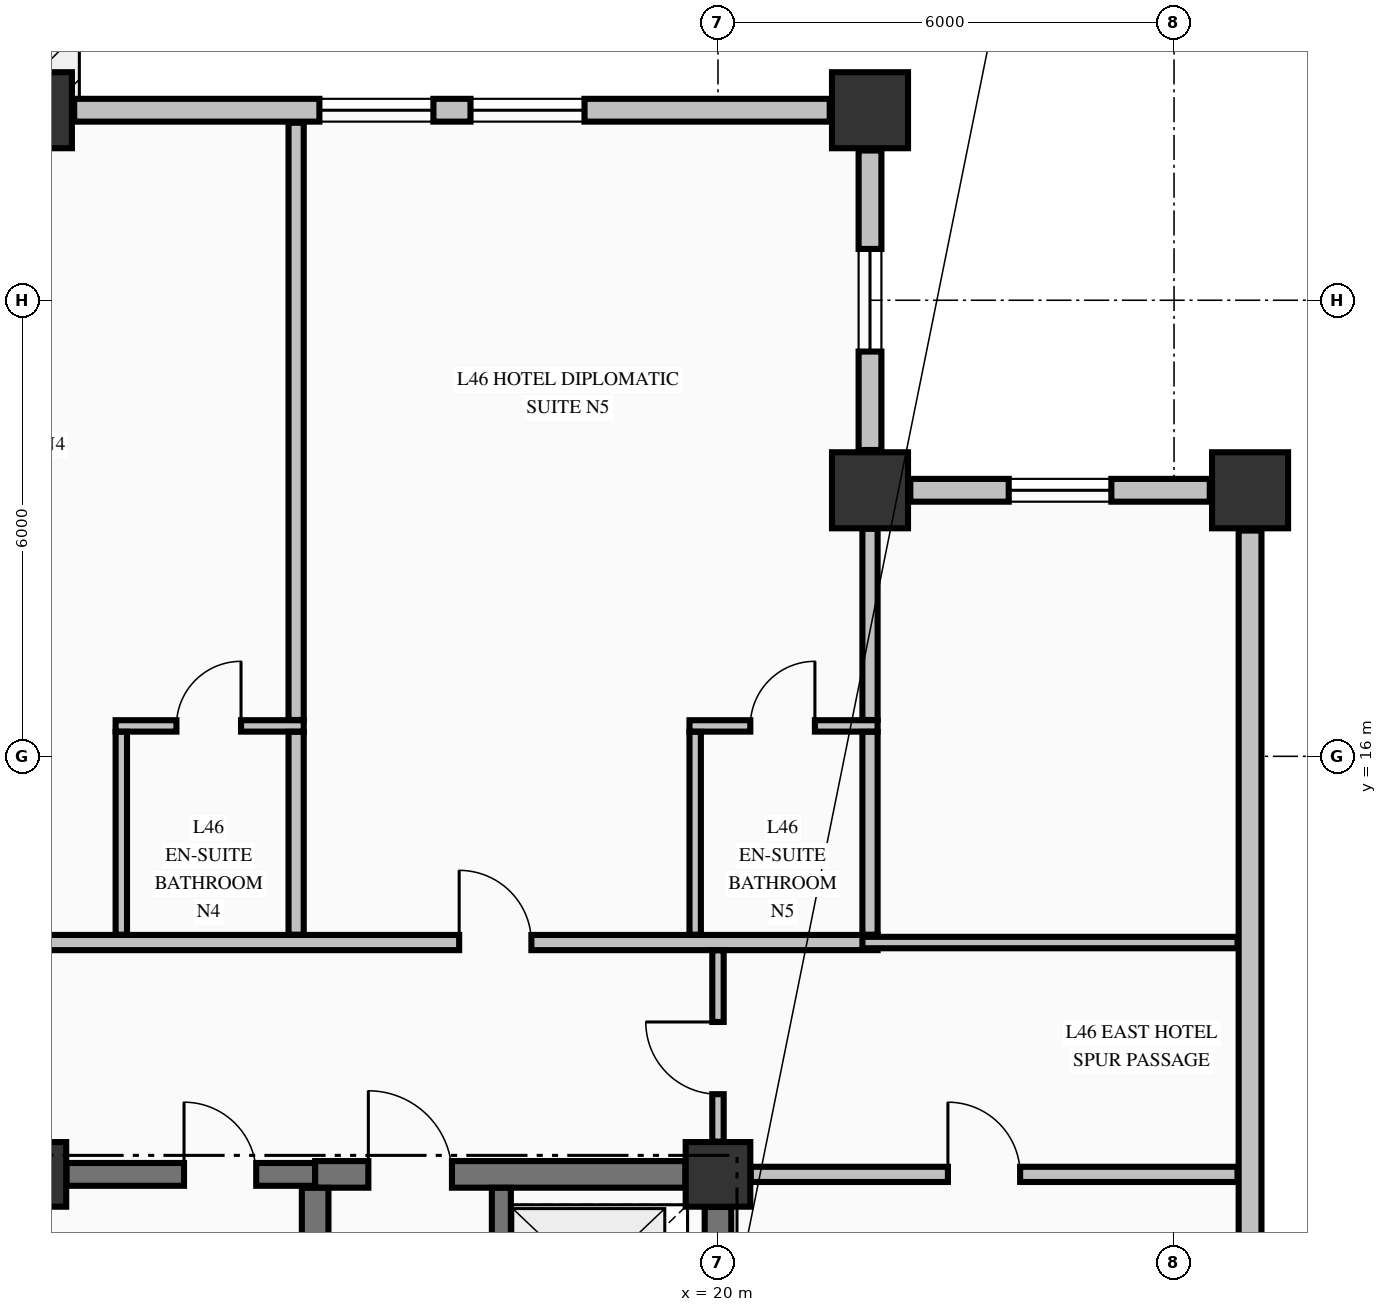
"""IFC4 building model, lengths in metres.
Left out: names, types, materials, properties, quantities, classifications, styles, units other than length and angle.
Written with IfcOpenShell. Run it as: python <this file> out.ifc"""

import sys

from ifc_helpers import new_model, si_unit, direction, frame, frame_2d, origin, origin_2d, place, context, subcontext, project, spatial, rectangle, extrude, element, fill, save


model = new_model("IFC4")
c1 = context("Model", 3, precision=1e-05, world=origin(), true_north=direction((0.0, 1.0)))
c2 = subcontext(c1, "Body", "Model", "MODEL_VIEW")
j1 = project(units=[si_unit("LENGTHUNIT", "METRE"), si_unit("PLANEANGLEUNIT", "RADIAN")], contexts=[c1])
p1 = place(None, origin())
s1 = spatial("IfcSite", under=j1, at=p1, CompositionType="ELEMENT")
p2 = place(p1, origin())
s2 = spatial("IfcBuilding", under=s1, at=p2, CompositionType="ELEMENT")
p3 = place(p2, frame((0.0, 0.0, 179.66)))
s3 = spatial("IfcBuildingStorey", under=s2, at=p3, CompositionType="ELEMENT", Elevation=179.66)
for number, where, z_axis, x_axis in (
    (1, (11.0, 24.5, -0.25), (0.0, 0.0, 1.0), (1.0, 0.0, 0.0)),
    (2, (22.0, 24.5, -0.25), (0.0, 0.0, 1.0), (1.0, 0.0, 0.0)),
    (3, (27.0, 19.5, -0.25), (0.0, 0.0, 1.0), (1.0, 0.0, 0.0)),
    (4, (22.0, 19.5, -0.25), (0.0, 0.0, 1.0), (1.0, 0.0, 0.0)),
):
    element("IfcColumn", number, at=place(p3, frame(where, z_axis=z_axis, x_axis=x_axis)), inside=s3, PredefinedType="COLUMN", context=c2, shape_type="SweptSolid", body=[
        extrude(rectangle(XDim=1.0, YDim=1.0, at=origin_2d()), origin(), (0.0, 0.0, 1.0), 3.4),
    ])
for number, where, z_axis, x_axis in (
    (5, (11.0, 10.5, -0.25), (0.0, 0.0, 1.0), (1.0, 0.0, 0.0)),
    (6, (20.0, 10.5, -0.25), (0.0, 0.0, 1.0), (1.0, 0.0, 0.0)),
):
    element("IfcColumn", number, at=place(p3, frame(where, z_axis=z_axis, x_axis=x_axis)), inside=s3, PredefinedType="COLUMN", context=c2, shape_type="SweptSolid", body=[
        extrude(rectangle(XDim=0.85, YDim=0.85, at=origin_2d()), origin(), (0.0, 0.0, 1.0), 3.4),
    ])
p4 = place(p3, frame((26.47, 19.5, 0.0), z_axis=(0.0, 0.0, 1.0), x_axis=(-1.0, 0.0, 0.0)))
e7 = element("IfcWall", 7, at=p4, inside=s3, PredefinedType="STANDARD", context=c2, shape_type="SweptSolid", body=[
    extrude(rectangle(XDim=3.94, YDim=0.3, at=frame_2d((1.97, 0.0))), origin(), (0.0, 0.0, 1.0), 2.542),
])
p5 = place(p4, frame((1.295, 0.0, 0.68)))
e8 = element("IfcOpeningElement", 8, at=p5, cuts=e7, PredefinedType="OPENING", context=c2, shape_type="SweptSolid", body=[
    extrude(rectangle(XDim=1.35, YDim=1.42, at=frame_2d((0.675, 0.71))), frame((0.0, 0.16, 0.0), z_axis=(0.0, -1.0, 0.0), x_axis=(1.0, 0.0, 0.0)), (0.0, 0.0, 1.0), 0.32),
])
p6 = place(p3, frame((22.0, 20.03, 0.0), z_axis=(0.0, 0.0, 1.0), x_axis=(0.0, 1.0, 0.0)))
e9 = element("IfcWall", 9, at=p6, inside=s3, PredefinedType="STANDARD", context=c2, shape_type="SweptSolid", body=[
    extrude(rectangle(XDim=3.94, YDim=0.3, at=frame_2d((1.97, 0.0))), origin(), (0.0, 0.0, 1.0), 2.542),
])
p7 = place(p6, frame((1.295, 0.0, 0.68)))
e10 = element("IfcOpeningElement", 10, at=p7, cuts=e9, PredefinedType="OPENING", context=c2, shape_type="SweptSolid", body=[
    extrude(rectangle(XDim=1.35, YDim=1.42, at=frame_2d((0.675, 0.71))), frame((0.0, 0.16, 0.0), z_axis=(0.0, -1.0, 0.0), x_axis=(1.0, 0.0, 0.0)), (0.0, 0.0, 1.0), 0.32),
])
p8 = place(p3, frame((21.47, 24.5, 0.0), z_axis=(0.0, 0.0, 1.0), x_axis=(-1.0, 0.0, 0.0)))
e11 = element("IfcWall", 11, at=p8, inside=s3, PredefinedType="STANDARD", context=c2, shape_type="SweptSolid", body=[
    extrude(rectangle(XDim=9.94, YDim=0.3, at=frame_2d((4.97, 0.0))), origin(), (0.0, 0.0, 1.0), 2.542),
])
p9 = place(p8, frame((3.226, 0.0, 0.72)))
e12 = element("IfcOpeningElement", 12, at=p9, cuts=e11, PredefinedType="OPENING", context=c2, shape_type="SweptSolid", body=[
    extrude(rectangle(XDim=1.5, YDim=1.6, at=frame_2d((0.75, 0.8))), frame((0.0, 0.16, 0.0), z_axis=(0.0, -1.0, 0.0), x_axis=(1.0, 0.0, 0.0)), (0.0, 0.0, 1.0), 0.32),
])
p10 = place(p8, frame((5.214, 0.0, 0.72)))
e13 = element("IfcOpeningElement", 13, at=p10, cuts=e11, PredefinedType="OPENING", context=c2, shape_type="SweptSolid", body=[
    extrude(rectangle(XDim=1.5, YDim=1.6, at=frame_2d((0.75, 0.8))), frame((0.0, 0.16, 0.0), z_axis=(0.0, -1.0, 0.0), x_axis=(1.0, 0.0, 0.0)), (0.0, 0.0, 1.0), 0.32),
])
p11 = place(p3, frame((27.0, 9.53, 0.0), z_axis=(0.0, 0.0, 1.0), x_axis=(0.0, 1.0, 0.0)))
e14 = element("IfcWall", 14, at=p11, inside=s3, PredefinedType="STANDARD", context=c2, shape_type="SweptSolid", body=[
    extrude(rectangle(XDim=9.44, YDim=0.3, at=frame_2d((4.72, 0.0))), origin(), (0.0, 0.0, 1.0), 2.542),
])
p12 = place(p3, frame((11.429, 10.5, 0.0), z_axis=(0.0, 0.0, 1.0), x_axis=(1.0, 0.0, 0.0)))
e15 = element("IfcWall", 15, at=p12, inside=s3, PredefinedType="SHEAR", context=c2, shape_type="SweptSolid", body=[
    extrude(rectangle(XDim=3.271, YDim=0.3, at=frame_2d((1.635, 0.0))), origin(), (0.0, 0.0, 1.0), 3.15),
])
p13 = place(p12, frame((1.546, 0.0, 0.0)))
e16 = element("IfcOpeningElement", 16, at=p13, cuts=e15, PredefinedType="OPENING", context=c2, shape_type="SweptSolid", body=[
    extrude(rectangle(XDim=0.95, YDim=2.15, at=frame_2d((0.475, 1.075))), frame((0.0, 0.16, 0.0), z_axis=(0.0, -1.0, 0.0), x_axis=(1.0, 0.0, 0.0)), (0.0, 0.0, 1.0), 0.32),
])
p14 = place(p3, frame((14.7, 10.5, 0.0), z_axis=(0.0, 0.0, 1.0), x_axis=(1.0, 0.0, 0.0)))
e17 = element("IfcWall", 17, at=p14, inside=s3, PredefinedType="SHEAR", context=c2, shape_type="SweptSolid", body=[
    extrude(rectangle(XDim=4.871, YDim=0.35, at=frame_2d((2.436, 0.0))), origin(), (0.0, 0.0, 1.0), 3.15),
])
p15 = place(p14, frame((0.7, 0.0, 0.0)))
e18 = element("IfcOpeningElement", 18, at=p15, cuts=e17, PredefinedType="OPENING", context=c2, shape_type="SweptSolid", body=[
    extrude(rectangle(XDim=1.1, YDim=2.15, at=frame_2d((0.55, 1.075))), frame((0.0, 0.185, 0.0), z_axis=(0.0, -1.0, 0.0), x_axis=(1.0, 0.0, 0.0)), (0.0, 0.0, 1.0), 0.37),
])
p16 = place(p3, frame((20.431, 10.5, 0.0), z_axis=(0.0, 0.0, 1.0), x_axis=(1.0, 0.0, 0.0)))
e19 = element("IfcWall", 19, at=p16, inside=s3, PredefinedType="PARTITIONING", context=c2, shape_type="SweptSolid", body=[
    extrude(rectangle(XDim=6.404, YDim=0.2, at=frame_2d((3.202, 0.0))), origin(), (0.0, 0.0, 1.0), 3.15),
])
p17 = place(p16, frame((2.594, 0.0, 0.0)))
e20 = element("IfcOpeningElement", 20, at=p17, cuts=e19, PredefinedType="OPENING", context=c2, shape_type="SweptSolid", body=[
    extrude(rectangle(XDim=0.95, YDim=2.15, at=frame_2d((0.475, 1.075))), frame((0.0, 0.11, 0.0), z_axis=(0.0, -1.0, 0.0), x_axis=(1.0, 0.0, 0.0)), (0.0, 0.0, 1.0), 0.22),
])
p18 = place(p3, frame((-17.1, 13.55, 0.0), z_axis=(0.0, 0.0, 1.0), x_axis=(1.0, 0.0, 0.0)))
e21 = element("IfcWall", 21, at=p18, inside=s3, PredefinedType="PARTITIONING", context=c2, shape_type="SweptSolid", body=[
    extrude(rectangle(XDim=39.2, YDim=0.2, at=frame_2d((19.6, 0.0))), origin(), (0.0, 0.0, 1.0), 3.15),
])
p19 = place(p18, frame((3.695, 0.0, 0.0)))
e22 = element("IfcOpeningElement", 22, at=p19, cuts=e21, PredefinedType="OPENING", context=c2, shape_type="SweptSolid", body=[
    extrude(rectangle(XDim=0.95, YDim=2.15, at=frame_2d((0.475, 1.075))), frame((0.0, 0.11, 0.0), z_axis=(0.0, -1.0, 0.0), x_axis=(1.0, 0.0, 0.0)), (0.0, 0.0, 1.0), 0.22),
])
p20 = place(p18, frame((11.695, 0.0, 0.0)))
e23 = element("IfcOpeningElement", 23, at=p20, cuts=e21, PredefinedType="OPENING", context=c2, shape_type="SweptSolid", body=[
    extrude(rectangle(XDim=0.95, YDim=2.15, at=frame_2d((0.475, 1.075))), frame((0.0, 0.11, 0.0), z_axis=(0.0, -1.0, 0.0), x_axis=(1.0, 0.0, 0.0)), (0.0, 0.0, 1.0), 0.22),
])
p21 = place(p18, frame((17.125, 0.0, 0.0)))
e24 = element("IfcOpeningElement", 24, at=p21, cuts=e21, PredefinedType="OPENING", context=c2, shape_type="SweptSolid", body=[
    extrude(rectangle(XDim=0.95, YDim=2.15, at=frame_2d((0.475, 1.075))), frame((0.0, 0.11, 0.0), z_axis=(0.0, -1.0, 0.0), x_axis=(1.0, 0.0, 0.0)), (0.0, 0.0, 1.0), 0.22),
])
p22 = place(p18, frame((25.325, 0.0, 0.0)))
e25 = element("IfcOpeningElement", 25, at=p22, cuts=e21, PredefinedType="OPENING", context=c2, shape_type="SweptSolid", body=[
    extrude(rectangle(XDim=0.95, YDim=2.15, at=frame_2d((0.475, 1.075))), frame((0.0, 0.11, 0.0), z_axis=(0.0, -1.0, 0.0), x_axis=(1.0, 0.0, 0.0)), (0.0, 0.0, 1.0), 0.22),
])
p23 = place(p18, frame((33.695, 0.0, 0.0)))
e26 = element("IfcOpeningElement", 26, at=p23, cuts=e21, PredefinedType="OPENING", context=c2, shape_type="SweptSolid", body=[
    extrude(rectangle(XDim=0.95, YDim=2.15, at=frame_2d((0.475, 1.075))), frame((0.0, 0.11, 0.0), z_axis=(0.0, -1.0, 0.0), x_axis=(1.0, 0.0, 0.0)), (0.0, 0.0, 1.0), 0.22),
])
p24 = place(p3, frame((21.9, 13.55, 0.0), z_axis=(0.0, 0.0, 1.0), x_axis=(1.0, 0.0, 0.0)))
e27 = element("IfcWall", 27, at=p24, inside=s3, PredefinedType="PARTITIONING", context=c2, shape_type="SweptSolid", body=[
    extrude(rectangle(XDim=4.935, YDim=0.15, at=frame_2d((2.468, 0.0))), origin(), (0.0, 0.0, 1.0), 3.15),
])
p25 = place(p3, frame((12.075, 16.4, 0.0), z_axis=(0.0, 0.0, 1.0), x_axis=(1.0, 0.0, 0.0)))
e28 = element("IfcWall", 28, at=p25, inside=s3, PredefinedType="PARTITIONING", context=c2, shape_type="SweptSolid", body=[
    extrude(rectangle(XDim=2.475, YDim=0.15, at=frame_2d((1.238, 0.0))), origin(), (0.0, 0.0, 1.0), 3.15),
])
p26 = place(p25, frame((0.8, 0.0, 0.0)))
e29 = element("IfcOpeningElement", 29, at=p26, cuts=e28, PredefinedType="OPENING", context=c2, shape_type="SweptSolid", body=[
    extrude(rectangle(XDim=0.85, YDim=2.1, at=frame_2d((0.425, 1.05))), frame((0.0, 0.085, 0.0), z_axis=(0.0, -1.0, 0.0), x_axis=(1.0, 0.0, 0.0)), (0.0, 0.0, 1.0), 0.17),
])
p27 = place(p3, frame((19.625, 16.4, 0.0), z_axis=(0.0, 0.0, 1.0), x_axis=(1.0, 0.0, 0.0)))
e30 = element("IfcWall", 30, at=p27, inside=s3, PredefinedType="PARTITIONING", context=c2, shape_type="SweptSolid", body=[
    extrude(rectangle(XDim=2.475, YDim=0.15, at=frame_2d((1.238, 0.0))), origin(), (0.0, 0.0, 1.0), 3.15),
])
p28 = place(p27, frame((0.8, 0.0, 0.0)))
e31 = element("IfcOpeningElement", 31, at=p28, cuts=e30, PredefinedType="OPENING", context=c2, shape_type="SweptSolid", body=[
    extrude(rectangle(XDim=0.85, YDim=2.1, at=frame_2d((0.425, 1.05))), frame((0.0, 0.085, 0.0), z_axis=(0.0, -1.0, 0.0), x_axis=(1.0, 0.0, 0.0)), (0.0, 0.0, 1.0), 0.17),
])
p29 = place(p3, frame((14.7, 5.852, 0.0), z_axis=(0.0, 0.0, 1.0), x_axis=(0.0, 1.0, 0.0)))
e32 = element("IfcWall", 32, at=p29, inside=s3, PredefinedType="SHEAR", context=c2, shape_type="SweptSolid", body=[
    extrude(rectangle(XDim=4.471, YDim=0.35, at=frame_2d((2.235, 0.0))), origin(), (0.0, 0.0, 1.0), 3.15),
])
p30 = place(p3, frame((17.15, 7.877, 0.0), z_axis=(0.0, 0.0, 1.0), x_axis=(0.0, 1.0, 0.0)))
e33 = element("IfcWall", 33, at=p30, inside=s3, PredefinedType="SOLIDWALL", context=c2, shape_type="SweptSolid", body=[
    extrude(rectangle(XDim=2.446, YDim=0.25, at=frame_2d((1.223, 0.0))), origin(), (0.0, 0.0, 1.0), 3.15),
])
p31 = place(p30, frame((0.698, 0.0, 0.0)))
e34 = element("IfcOpeningElement", 34, at=p31, cuts=e33, PredefinedType="OPENING", context=c2, shape_type="SweptSolid", body=[
    extrude(rectangle(XDim=1.1, YDim=2.2, at=frame_2d((0.55, 1.1))), frame((0.0, 0.135, 0.0), z_axis=(0.0, -1.0, 0.0), x_axis=(1.0, 0.0, 0.0)), (0.0, 0.0, 1.0), 0.27),
])
p32 = place(p3, frame((20.0, 7.877, 0.0), z_axis=(0.0, 0.0, 1.0), x_axis=(0.0, 1.0, 0.0)))
e35 = element("IfcWall", 35, at=p32, inside=s3, PredefinedType="SHEAR", context=c2, shape_type="SweptSolid", body=[
    extrude(rectangle(XDim=2.194, YDim=0.35, at=frame_2d((1.097, 0.0))), origin(), (0.0, 0.0, 1.0), 3.15),
])
p33 = place(p3, frame((12.15, 13.653, 0.0), z_axis=(0.0, 0.0, 1.0), x_axis=(0.0, 1.0, 0.0)))
e36 = element("IfcWall", 36, at=p33, inside=s3, PredefinedType="PARTITIONING", context=c2, shape_type="SweptSolid", body=[
    extrude(rectangle(XDim=2.669, YDim=0.15, at=frame_2d((1.334, 0.0))), origin(), (0.0, 0.0, 1.0), 3.15),
])
p34 = place(p3, frame((14.45, 13.653, 0.0), z_axis=(0.0, 0.0, 1.0), x_axis=(0.0, 1.0, 0.0)))
e37 = element("IfcWall", 37, at=p34, inside=s3, PredefinedType="PARTITIONING", context=c2, shape_type="SweptSolid", body=[
    extrude(rectangle(XDim=2.669, YDim=0.2, at=frame_2d((1.334, 0.0))), origin(), (0.0, 0.0, 1.0), 3.15),
])
p35 = place(p3, frame((14.45, 16.478, 0.0), z_axis=(0.0, 0.0, 1.0), x_axis=(0.0, 1.0, 0.0)))
e38 = element("IfcWall", 38, at=p35, inside=s3, PredefinedType="PARTITIONING", context=c2, shape_type="SweptSolid", body=[
    extrude(rectangle(XDim=7.857, YDim=0.2, at=frame_2d((3.928, 0.0))), origin(), (0.0, 0.0, 1.0), 3.15),
])
p36 = place(p3, frame((19.7, 13.653, 0.0), z_axis=(0.0, 0.0, 1.0), x_axis=(0.0, 1.0, 0.0)))
e39 = element("IfcWall", 39, at=p36, inside=s3, PredefinedType="PARTITIONING", context=c2, shape_type="SweptSolid", body=[
    extrude(rectangle(XDim=2.669, YDim=0.15, at=frame_2d((1.334, 0.0))), origin(), (0.0, 0.0, 1.0), 2.342),
])
p37 = place(p3, frame((20.0, 10.931, 0.0), z_axis=(0.0, 0.0, 1.0), x_axis=(0.0, 1.0, 0.0)))
e40 = element("IfcWall", 40, at=p37, inside=s3, PredefinedType="PARTITIONING", context=c2, shape_type="SweptSolid", body=[
    extrude(rectangle(XDim=2.516, YDim=0.15, at=frame_2d((1.258, 0.0))), origin(), (0.0, 0.0, 1.0), 2.342),
])
p38 = place(p37, frame((0.624, 0.0, 0.0)))
e41 = element("IfcOpeningElement", 41, at=p38, cuts=e40, PredefinedType="OPENING", context=c2, shape_type="SweptSolid", body=[
    extrude(rectangle(XDim=0.95, YDim=2.15, at=frame_2d((0.475, 1.075))), frame((0.0, 0.085, 0.0), z_axis=(0.0, -1.0, 0.0), x_axis=(1.0, 0.0, 0.0)), (0.0, 0.0, 1.0), 0.17),
])
p39 = place(p3, frame((22.0, 13.653, 0.0), z_axis=(0.0, 0.0, 1.0), x_axis=(0.0, 1.0, 0.0)))
e42 = element("IfcWall", 42, at=p39, inside=s3, PredefinedType="PARTITIONING", context=c2, shape_type="SweptSolid", body=[
    extrude(rectangle(XDim=2.669, YDim=0.2, at=frame_2d((1.334, 0.0))), origin(), (0.0, 0.0, 1.0), 3.15),
])
p40 = place(p3, frame((22.0, 16.478, 0.0), z_axis=(0.0, 0.0, 1.0), x_axis=(0.0, 1.0, 0.0)))
e43 = element("IfcWall", 43, at=p40, inside=s3, PredefinedType="PARTITIONING", context=c2, shape_type="SweptSolid", body=[
    extrude(rectangle(XDim=2.516, YDim=0.2, at=frame_2d((1.258, 0.0))), origin(), (0.0, 0.0, 1.0), 3.15),
])
p41 = place(p5, origin())
e44 = element("IfcWindow", 44, at=p41, inside=s3, PartitioningType="SINGLE_PANEL", PredefinedType="WINDOW", context=c2, shape_type="SweptSolid", body=[
    extrude(rectangle(XDim=1.35, YDim=1.42, at=frame_2d((0.675, 0.71))), frame((0.0, 0.03, 0.0), z_axis=(0.0, -1.0, 0.0), x_axis=(1.0, 0.0, 0.0)), (0.0, 0.0, 1.0), 0.06),
])
fill(e8, e44)
p42 = place(p7, origin())
e45 = element("IfcWindow", 45, at=p42, inside=s3, PartitioningType="SINGLE_PANEL", PredefinedType="WINDOW", context=c2, shape_type="SweptSolid", body=[
    extrude(rectangle(XDim=1.35, YDim=1.42, at=frame_2d((0.675, 0.71))), frame((0.0, 0.03, 0.0), z_axis=(0.0, -1.0, 0.0), x_axis=(1.0, 0.0, 0.0)), (0.0, 0.0, 1.0), 0.06),
])
fill(e10, e45)
p43 = place(p9, origin())
e46 = element("IfcWindow", 46, at=p43, inside=s3, PartitioningType="SINGLE_PANEL", PredefinedType="WINDOW", context=c2, shape_type="SweptSolid", body=[
    extrude(rectangle(XDim=1.5, YDim=1.6, at=frame_2d((0.75, 0.8))), frame((0.0, 0.03, 0.0), z_axis=(0.0, -1.0, 0.0), x_axis=(1.0, 0.0, 0.0)), (0.0, 0.0, 1.0), 0.06),
])
fill(e12, e46)
p44 = place(p10, origin())
e47 = element("IfcWindow", 47, at=p44, inside=s3, PartitioningType="SINGLE_PANEL", PredefinedType="WINDOW", context=c2, shape_type="SweptSolid", body=[
    extrude(rectangle(XDim=1.5, YDim=1.6, at=frame_2d((0.75, 0.8))), frame((0.0, 0.03, 0.0), z_axis=(0.0, -1.0, 0.0), x_axis=(1.0, 0.0, 0.0)), (0.0, 0.0, 1.0), 0.06),
])
fill(e13, e47)
p45 = place(p13, origin())
e48 = element("IfcDoor", 48, at=p45, inside=s3, OperationType="SINGLE_SWING_LEFT", PredefinedType="DOOR", context=c2, shape_type="SweptSolid", body=[
    extrude(rectangle(XDim=0.95, YDim=2.15, at=frame_2d((0.475, 1.075))), frame((0.0, 0.025, 0.0), z_axis=(0.0, -1.0, 0.0), x_axis=(1.0, 0.0, 0.0)), (0.0, 0.0, 1.0), 0.05),
])
fill(e16, e48)
p46 = place(p15, origin())
e49 = element("IfcDoor", 49, at=p46, inside=s3, OperationType="SINGLE_SWING_LEFT", PredefinedType="DOOR", context=c2, shape_type="SweptSolid", body=[
    extrude(rectangle(XDim=1.1, YDim=2.15, at=frame_2d((0.55, 1.075))), frame((0.0, 0.025, 0.0), z_axis=(0.0, -1.0, 0.0), x_axis=(1.0, 0.0, 0.0)), (0.0, 0.0, 1.0), 0.05),
])
fill(e18, e49)
p47 = place(p26, origin())
e50 = element("IfcDoor", 50, at=p47, inside=s3, OperationType="SINGLE_SWING_RIGHT", PredefinedType="DOOR", context=c2, shape_type="SweptSolid", body=[
    extrude(rectangle(XDim=0.85, YDim=2.1, at=frame_2d((0.425, 1.05))), frame((0.0, 0.025, 0.0), z_axis=(0.0, -1.0, 0.0), x_axis=(1.0, 0.0, 0.0)), (0.0, 0.0, 1.0), 0.05),
])
fill(e29, e50)
p48 = place(p23, origin())
e51 = element("IfcDoor", 51, at=p48, inside=s3, OperationType="SINGLE_SWING_LEFT", PredefinedType="DOOR", context=c2, shape_type="SweptSolid", body=[
    extrude(rectangle(XDim=0.95, YDim=2.15, at=frame_2d((0.475, 1.075))), frame((0.0, 0.025, 0.0), z_axis=(0.0, -1.0, 0.0), x_axis=(1.0, 0.0, 0.0)), (0.0, 0.0, 1.0), 0.05),
])
fill(e26, e51)
p49 = place(p28, origin())
e52 = element("IfcDoor", 52, at=p49, inside=s3, OperationType="SINGLE_SWING_RIGHT", PredefinedType="DOOR", context=c2, shape_type="SweptSolid", body=[
    extrude(rectangle(XDim=0.85, YDim=2.1, at=frame_2d((0.425, 1.05))), frame((0.0, 0.025, 0.0), z_axis=(0.0, -1.0, 0.0), x_axis=(1.0, 0.0, 0.0)), (0.0, 0.0, 1.0), 0.05),
])
fill(e31, e52)
p50 = place(p38, origin())
e53 = element("IfcDoor", 53, at=p50, inside=s3, OperationType="SINGLE_SWING_RIGHT", PredefinedType="DOOR", context=c2, shape_type="SweptSolid", body=[
    extrude(rectangle(XDim=0.95, YDim=2.15, at=frame_2d((0.475, 1.075))), frame((0.0, 0.025, 0.0), z_axis=(0.0, -1.0, 0.0), x_axis=(1.0, 0.0, 0.0)), (0.0, 0.0, 1.0), 0.05),
])
fill(e41, e53)
p51 = place(p17, origin())
e54 = element("IfcDoor", 54, at=p51, inside=s3, OperationType="SINGLE_SWING_LEFT", PredefinedType="DOOR", context=c2, shape_type="SweptSolid", body=[
    extrude(rectangle(XDim=0.95, YDim=2.15, at=frame_2d((0.475, 1.075))), frame((0.0, 0.025, 0.0), z_axis=(0.0, -1.0, 0.0), x_axis=(1.0, 0.0, 0.0)), (0.0, 0.0, 1.0), 0.05),
])
fill(e20, e54)
save(model, sys.argv[1])
